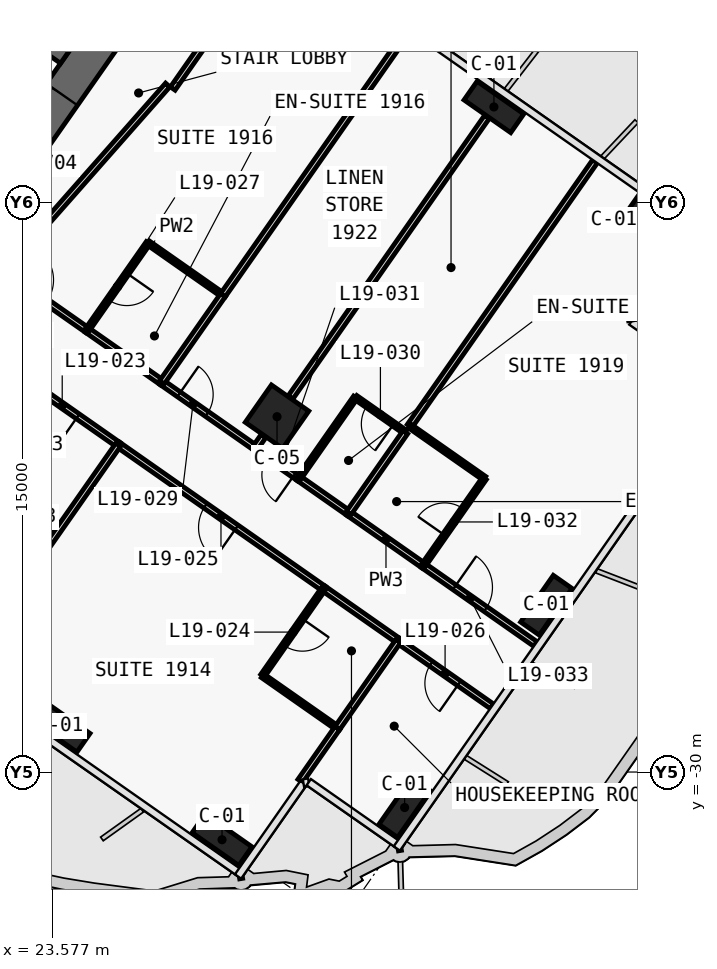
"""IFC4 building model, lengths in metres.
Left out: names, types, materials, properties, quantities, classifications, styles, units other than length and angle.
Written with IfcOpenShell. Run it as: python <this file> out.ifc"""

import sys

from ifc_helpers import new_model, si_unit, direction, frame, frame_2d, origin, origin_2d, place, context, subcontext, project, spatial, polyline, rectangle, outline, extrude, element, fill, save


model = new_model("IFC4")
c1 = context("Model", 3, precision=1e-05, world=origin(), true_north=direction((0.0, 1.0)))
c2 = subcontext(c1, "Body", "Model", "MODEL_VIEW")
j1 = project(units=[si_unit("LENGTHUNIT", "METRE"), si_unit("PLANEANGLEUNIT", "RADIAN")], contexts=[c1])
p1 = place(None, origin())
s1 = spatial("IfcSite", under=j1, at=p1, CompositionType="ELEMENT")
p2 = place(p1, origin())
s2 = spatial("IfcBuilding", under=s1, at=p2, CompositionType="ELEMENT")
p3 = place(p2, frame((0.0, 0.0, 94.1)))
s3 = spatial("IfcBuildingStorey", under=s2, at=p3, CompositionType="ELEMENT", Elevation=94.1)
p4 = place(p3, frame((21.708, -15.2, 0.0), z_axis=(0.0, 0.0, 1.0), x_axis=(0.573576324356, 0.819152122709, 0.0)))
e1 = element("IfcWall", 1, at=p4, inside=s3, PredefinedType="SHEAR", context=c2, shape_type="SweptSolid", body=[
    extrude(outline(polyline([(9.2, 0.5), (0.0, 0.5), (0.0, -0.5), (9.2, -0.5), (9.2, 0.5)])), origin(), (0.0, 0.0, 1.0), 3.6),
])
p5 = place(p4, frame((6.1, 0.0, 0.0)))
e2 = element("IfcOpeningElement", 2, at=p5, cuts=e1, PredefinedType="OPENING", context=c2, shape_type="SweptSolid", body=[
    extrude(rectangle(XDim=1.8, YDim=2.1, at=frame_2d((0.9, 1.05))), frame((0.0, 0.51, 0.0), z_axis=(0.0, -1.0, 0.0), x_axis=(1.0, 0.0, 0.0)), (0.0, 0.0, 1.0), 1.02),
])
p6 = place(p4, frame((1.9, 0.0, 0.0)))
e3 = element("IfcOpeningElement", 3, at=p6, cuts=e1, PredefinedType="OPENING", context=c2, shape_type="SweptSolid", body=[
    extrude(rectangle(XDim=1.8, YDim=2.1, at=frame_2d((0.9, 1.05))), frame((0.0, 0.51, 0.0), z_axis=(0.0, -1.0, 0.0), x_axis=(1.0, 0.0, 0.0)), (0.0, 0.0, 1.0), 1.02),
])
p7 = place(p3, frame((2.638, 3.768, 0.0), z_axis=(0.0, 0.0, 1.0), x_axis=(0.819148977158, -0.573580816643, 0.0)))
e4 = element("IfcWall", 4, at=p7, inside=s3, PredefinedType="SHEAR", context=c2, shape_type="SweptSolid", body=[
    extrude(outline(polyline([(0.0, 0.25), (0.0, -0.25), (26.0, -0.25), (26.0, 0.25), (0.0, 0.25)])), origin(), (0.0, 0.0, 1.0), 3.6),
])
p8 = place(p7, frame((9.637, 0.0, 0.0)))
e5 = element("IfcOpeningElement", 5, at=p8, cuts=e4, PredefinedType="OPENING", context=c2, shape_type="SweptSolid", body=[
    extrude(rectangle(XDim=1.2, YDim=2.1, at=frame_2d((0.6, 1.05))), frame((0.0, 0.26, 0.0), z_axis=(0.0, -1.0, 0.0), x_axis=(1.0, 0.0, 0.0)), (0.0, 0.0, 1.0), 0.52),
])
p9 = place(p7, frame((11.812, 0.0, 0.0)))
e6 = element("IfcOpeningElement", 6, at=p9, cuts=e4, PredefinedType="OPENING", context=c2, shape_type="SweptSolid", body=[
    extrude(rectangle(XDim=1.2, YDim=2.1, at=frame_2d((0.6, 1.05))), frame((0.0, 0.26, 0.0), z_axis=(0.0, -1.0, 0.0), x_axis=(1.0, 0.0, 0.0)), (0.0, 0.0, 1.0), 0.52),
])
p10 = place(p7, frame((13.988, 0.0, 0.0)))
e7 = element("IfcOpeningElement", 7, at=p10, cuts=e4, PredefinedType="OPENING", context=c2, shape_type="SweptSolid", body=[
    extrude(rectangle(XDim=1.2, YDim=2.1, at=frame_2d((0.6, 1.05))), frame((0.0, 0.26, 0.0), z_axis=(0.0, -1.0, 0.0), x_axis=(1.0, 0.0, 0.0)), (0.0, 0.0, 1.0), 0.52),
])
p11 = place(p7, frame((16.262, 0.0, 0.0)))
e8 = element("IfcOpeningElement", 8, at=p11, cuts=e4, PredefinedType="OPENING", context=c2, shape_type="SweptSolid", body=[
    extrude(rectangle(XDim=1.0, YDim=2.1, at=frame_2d((0.5, 1.05))), frame((0.0, 0.26, 0.0), z_axis=(0.0, -1.0, 0.0), x_axis=(1.0, 0.0, 0.0)), (0.0, 0.0, 1.0), 0.52),
])
for number, where, z_axis, x_axis in (
    (9, (23.782, -28.799, 0.0), (0.0, 0.0, 1.0), (0.819, -0.574, 0.0)),
    (10, (28.042, -31.782, 0.0), (0.0, 0.0, 1.0), (0.819, -0.574, 0.0)),
    (11, (35.197, -12.498, 0.0), (0.0, 0.0, 1.0), (0.819, -0.574, 0.0)),
    (12, (39.456, -15.481, 0.0), (0.0, 0.0, 1.0), (0.819, -0.574, 0.0)),
    (13, (32.847, -30.935, 0.0), (0.0, 0.0, 1.0), (0.574, 0.819, 0.0)),
    (14, (36.575, -25.61, 0.0), (0.0, 0.0, 1.0), (0.574, 0.819, 0.0)),
):
    element("IfcColumn", number, at=place(p3, frame(where, z_axis=z_axis, x_axis=x_axis)), inside=s3, PredefinedType="COLUMN", context=c2, shape_type="SweptSolid", body=[
        extrude(rectangle(XDim=1.5, YDim=0.6, at=origin_2d()), origin(), (0.0, 0.0, 1.0), 3.6),
    ])
p12 = place(p3, frame((29.49, -20.649, 0.0), z_axis=(0.0, 0.0, 1.0), x_axis=(0.819152044289, -0.573576436351, 0.0)))
e15 = element("IfcColumn", 15, at=p12, inside=s3, PredefinedType="COLUMN", context=c2, shape_type="SweptSolid", body=[
    extrude(rectangle(XDim=1.2, YDim=1.2, at=origin_2d()), origin(), (0.0, 0.0, 1.0), 3.6),
])
p13 = place(p3, frame((22.284, -16.824, 0.0), z_axis=(0.0, 0.0, 1.0), x_axis=(0.819176640776, -0.573541307325, 0.0)))
e16 = element("IfcWall", 16, at=p13, inside=s3, PredefinedType="PARTITIONING", context=c2, shape_type="SweptSolid", body=[
    extrude(rectangle(XDim=2.698, YDim=0.15, at=frame_2d((1.349, 0.0))), origin(), (0.0, 0.0, 1.0), 3.32),
])
p14 = place(p13, frame((0.396, 0.0, 0.0)))
e17 = element("IfcOpeningElement", 17, at=p14, cuts=e16, PredefinedType="OPENING", context=c2, shape_type="SweptSolid", body=[
    extrude(rectangle(XDim=1.0, YDim=2.1, at=frame_2d((0.5, 1.05))), frame((0.0, 0.085, 0.0), z_axis=(0.0, -1.0, 0.0), x_axis=(1.0, 0.0, 0.0)), (0.0, 0.0, 1.0), 0.17),
])
p15 = place(p3, frame((24.491, -18.369, 0.0), z_axis=(0.0, 0.0, 1.0), x_axis=(0.819179439794, -0.573537309527, 0.0)))
e18 = element("IfcWall", 18, at=p15, inside=s3, PredefinedType="PARTITIONING", context=c2, shape_type="SweptSolid", body=[
    extrude(rectangle(XDim=2.404, YDim=0.15, at=frame_2d((1.202, 0.0))), origin(), (0.0, 0.0, 1.0), 3.32),
])
p16 = place(p3, frame((26.457, -19.746, 0.0), z_axis=(0.0, 0.0, 1.0), x_axis=(0.81916700466, -0.573555070134, 0.0)))
e19 = element("IfcWall", 19, at=p16, inside=s3, PredefinedType="PARTITIONING", context=c2, shape_type="SweptSolid", body=[
    extrude(rectangle(XDim=3.004, YDim=0.15, at=frame_2d((1.502, 0.0))), origin(), (0.0, 0.0, 1.0), 2.6),
])
p17 = place(p16, frame((0.552, 0.0, 0.0)))
e20 = element("IfcOpeningElement", 20, at=p17, cuts=e19, PredefinedType="OPENING", context=c2, shape_type="SweptSolid", body=[
    extrude(rectangle(XDim=0.9, YDim=2.1, at=frame_2d((0.45, 1.05))), frame((0.0, 0.085, 0.0), z_axis=(0.0, -1.0, 0.0), x_axis=(1.0, 0.0, 0.0)), (0.0, 0.0, 1.0), 0.17),
])
p18 = place(p3, frame((30.063, -22.271, 0.0), z_axis=(0.0, 0.0, 1.0), x_axis=(-0.81914197737, 0.573590813132, 0.0)))
e21 = element("IfcWall", 21, at=p18, inside=s3, PredefinedType="PARTITIONING", context=c2, shape_type="SweptSolid", body=[
    extrude(rectangle(XDim=1.403, YDim=0.15, at=frame_2d((0.701, 0.0))), origin(), (0.0, 0.0, 1.0), 2.6),
])
p19 = place(p18, frame((0.15, 0.0, 0.0)))
e22 = element("IfcOpeningElement", 22, at=p19, cuts=e21, PredefinedType="OPENING", context=c2, shape_type="SweptSolid", body=[
    extrude(rectangle(XDim=0.85, YDim=2.1, at=frame_2d((0.425, 1.05))), frame((0.0, 0.085, 0.0), z_axis=(0.0, -1.0, 0.0), x_axis=(1.0, 0.0, 0.0)), (0.0, 0.0, 1.0), 0.17),
])
p20 = place(p3, frame((30.061, -22.27, 0.0), z_axis=(0.0, 0.0, 1.0), x_axis=(0.819189013667, -0.573523634986, 0.0)))
e23 = element("IfcWall", 23, at=p20, inside=s3, PredefinedType="PARTITIONING", context=c2, shape_type="SweptSolid", body=[
    extrude(rectangle(XDim=1.604, YDim=0.15, at=frame_2d((0.802, 0.0))), origin(), (0.0, 0.0, 1.0), 3.32),
])
p21 = place(p3, frame((33.338, -24.565, 0.0), z_axis=(0.0, 0.0, 1.0), x_axis=(0.819171400631, -0.573548791636, 0.0)))
e24 = element("IfcWall", 24, at=p21, inside=s3, PredefinedType="PARTITIONING", context=c2, shape_type="SweptSolid", body=[
    extrude(rectangle(XDim=3.601, YDim=0.15, at=frame_2d((1.801, 0.0))), origin(), (0.0, 0.0, 1.0), 2.5),
])
p22 = place(p21, frame((1.001, 0.0, 0.0)))
e25 = element("IfcOpeningElement", 25, at=p22, cuts=e24, PredefinedType="OPENING", context=c2, shape_type="SweptSolid", body=[
    extrude(rectangle(XDim=1.0, YDim=2.1, at=frame_2d((0.5, 1.05))), frame((0.0, 0.085, 0.0), z_axis=(0.0, -1.0, 0.0), x_axis=(1.0, 0.0, 0.0)), (0.0, 0.0, 1.0), 0.17),
])
p23 = place(p3, frame((31.372, -23.188, 0.0), z_axis=(0.0, 0.0, 1.0), x_axis=(0.819179439794, -0.573537309527, 0.0)))
e26 = element("IfcWall", 26, at=p23, inside=s3, PredefinedType="PARTITIONING", context=c2, shape_type="SweptSolid", body=[
    extrude(rectangle(XDim=2.404, YDim=0.15, at=frame_2d((1.202, 0.0))), origin(), (0.0, 0.0, 1.0), 3.32),
])
p24 = place(p3, frame((25.313, -21.387, 0.0), z_axis=(0.0, 0.0, 1.0), x_axis=(-0.819145961204, 0.573585123798, 0.0)))
e27 = element("IfcWall", 27, at=p24, inside=s3, PredefinedType="PARTITIONING", context=c2, shape_type="SweptSolid", body=[
    extrude(rectangle(XDim=3.603, YDim=0.15, at=frame_2d((1.802, 0.0))), origin(), (0.0, 0.0, 1.0), 3.32),
])
p25 = place(p24, frame((1.302, 0.0, 0.0)))
e28 = element("IfcOpeningElement", 28, at=p25, cuts=e27, PredefinedType="OPENING", context=c2, shape_type="SweptSolid", body=[
    extrude(rectangle(XDim=1.0, YDim=2.1, at=frame_2d((0.5, 1.05))), frame((0.0, 0.085, 0.0), z_axis=(0.0, -1.0, 0.0), x_axis=(1.0, 0.0, 0.0)), (0.0, 0.0, 1.0), 0.17),
])
p26 = place(p3, frame((30.719, -25.172, 0.0), z_axis=(0.0, 0.0, 1.0), x_axis=(-0.819153746897, 0.573574004767, 0.0)))
e29 = element("IfcWall", 29, at=p26, inside=s3, PredefinedType="PARTITIONING", context=c2, shape_type="SweptSolid", body=[
    extrude(rectangle(XDim=6.603, YDim=0.15, at=frame_2d((3.302, 0.0))), origin(), (0.0, 0.0, 1.0), 2.6),
])
p27 = place(p26, frame((2.801, 0.0, 0.0)))
e30 = element("IfcOpeningElement", 30, at=p27, cuts=e29, PredefinedType="OPENING", context=c2, shape_type="SweptSolid", body=[
    extrude(rectangle(XDim=1.0, YDim=2.1, at=frame_2d((0.5, 1.05))), frame((0.0, 0.085, 0.0), z_axis=(0.0, -1.0, 0.0), x_axis=(1.0, 0.0, 0.0)), (0.0, 0.0, 1.0), 0.17),
])
p28 = place(p3, frame((32.685, -26.549, 0.0), z_axis=(0.0, 0.0, 1.0), x_axis=(-0.819146032251, 0.573585022335, 0.0)))
e31 = element("IfcWall", 31, at=p28, inside=s3, PredefinedType="PARTITIONING", context=c2, shape_type="SweptSolid", body=[
    extrude(rectangle(XDim=2.404, YDim=0.15, at=frame_2d((1.202, 0.0))), origin(), (0.0, 0.0, 1.0), 3.32),
])
p29 = place(p3, frame((35.141, -28.268, 0.0), z_axis=(0.0, 0.0, 1.0), x_axis=(-0.81915932427, 0.57356603932, 0.0)))
e32 = element("IfcWall", 32, at=p29, inside=s3, PredefinedType="PARTITIONING", context=c2, shape_type="SweptSolid", body=[
    extrude(rectangle(XDim=3.002, YDim=0.15, at=frame_2d((1.501, 0.0))), origin(), (0.0, 0.0, 1.0), 2.5),
])
p30 = place(p29, frame((1.051, 0.0, 0.0)))
e33 = element("IfcOpeningElement", 33, at=p30, cuts=e32, PredefinedType="OPENING", context=c2, shape_type="SweptSolid", body=[
    extrude(rectangle(XDim=0.9, YDim=2.1, at=frame_2d((0.45, 1.05))), frame((0.0, 0.085, 0.0), z_axis=(0.0, -1.0, 0.0), x_axis=(1.0, 0.0, 0.0)), (0.0, 0.0, 1.0), 0.17),
])
p31 = place(p3, frame((26.098, -16.076, 0.0), z_axis=(0.0, 0.0, 1.0), x_axis=(-0.573550118428, -0.819170471667, 0.0)))
e34 = element("IfcWall", 34, at=p31, inside=s3, PredefinedType="PARTITIONING", context=c2, shape_type="SweptSolid", body=[
    extrude(rectangle(XDim=2.8, YDim=0.12, at=frame_2d((1.4, 0.0))), origin(), (0.0, 0.0, 1.0), 2.6),
])
p32 = place(p31, frame((0.975, 0.0, 0.0)))
e35 = element("IfcOpeningElement", 35, at=p32, cuts=e34, PredefinedType="OPENING", context=c2, shape_type="SweptSolid", body=[
    extrude(rectangle(XDim=0.85, YDim=2.05, at=frame_2d((0.425, 1.025))), frame((0.0, 0.07, 0.0), z_axis=(0.0, -1.0, 0.0), x_axis=(1.0, 0.0, 0.0)), (0.0, 0.0, 1.0), 0.14),
])
p33 = place(p3, frame((28.065, -17.453, 0.0), z_axis=(0.0, 0.0, 1.0), x_axis=(-0.819155442668, 0.573571582932, 0.0)))
e36 = element("IfcWall", 36, at=p33, inside=s3, PredefinedType="PARTITIONING", context=c2, shape_type="SweptSolid", body=[
    extrude(rectangle(XDim=2.4, YDim=0.12, at=frame_2d((1.2, 0.0))), origin(), (0.0, 0.0, 1.0), 3.32),
])
p34 = place(p3, frame((32.94, -10.491, 0.0), z_axis=(0.0, 0.0, 1.0), x_axis=(-0.573593433868, -0.819140142237, 0.0)))
e37 = element("IfcWall", 37, at=p34, inside=s3, PredefinedType="PARTITIONING", context=c2, shape_type="SweptSolid", body=[
    extrude(rectangle(XDim=8.499, YDim=0.15, at=frame_2d((4.25, 0.0))), origin(), (0.0, 0.0, 1.0), 2.6),
])
p35 = place(p3, frame((22.285, -16.825, 0.0), z_axis=(0.0, 0.0, 1.0), x_axis=(0.661551268245, 0.749899939647, 0.0)))
e38 = element("IfcWall", 38, at=p35, inside=s3, PredefinedType="PARTITIONING", context=c2, shape_type="SweptSolid", body=[
    extrude(rectangle(XDim=6.541, YDim=0.15, at=frame_2d((3.271, 0.0))), origin(), (0.0, 0.0, 1.0), 2.6),
])
p36 = place(p3, frame((26.746, -12.014, 0.0), z_axis=(0.0, 0.0, 1.0), x_axis=(0.573560650686, 0.819163097304, 0.0)))
e39 = element("IfcWall", 39, at=p36, inside=s3, PredefinedType="PARTITIONING", context=c2, shape_type="SweptSolid", body=[
    extrude(rectangle(XDim=3.0, YDim=0.15, at=frame_2d((1.5, 0.0))), origin(), (0.0, 0.0, 1.0), 3.32),
])
p37 = place(p3, frame((28.064, -17.454, 0.0), z_axis=(0.0, 0.0, 1.0), x_axis=(-0.573550118428, -0.819170471667, 0.0)))
e40 = element("IfcWall", 40, at=p37, inside=s3, PredefinedType="PARTITIONING", context=c2, shape_type="SweptSolid", body=[
    extrude(rectangle(XDim=2.8, YDim=0.15, at=frame_2d((1.4, 0.0))), origin(), (0.0, 0.0, 1.0), 2.6),
])
p38 = place(p3, frame((35.013, -12.76, 0.0), z_axis=(0.0, 0.0, 1.0), x_axis=(-0.573558725113, -0.819164445546, 0.0)))
e41 = element("IfcWall", 41, at=p38, inside=s3, PredefinedType="PARTITIONING", context=c2, shape_type="SweptSolid", body=[
    extrude(rectangle(XDim=9.01, YDim=0.15, at=frame_2d((4.505, 0.0))), origin(), (0.0, 0.0, 1.0), 2.6),
])
p39 = place(p3, frame((29.134, -21.156, 0.0), z_axis=(0.0, 0.0, 1.0), x_axis=(-0.572944929411, -0.819593867633, 0.0)))
e42 = element("IfcWall", 42, at=p39, inside=s3, PredefinedType="PARTITIONING", context=c2, shape_type="SweptSolid", body=[
    extrude(rectangle(XDim=0.38, YDim=0.15, at=frame_2d((0.19, 0.0))), origin(), (0.0, 0.0, 1.0), 2.6),
])
p40 = place(p3, frame((32.865, -21.058, 0.0), z_axis=(0.0, 0.0, 1.0), x_axis=(-0.819131543282, 0.57360571371, 0.0)))
e43 = element("IfcWall", 43, at=p40, inside=s3, PredefinedType="PARTITIONING", context=c2, shape_type="SweptSolid", body=[
    extrude(rectangle(XDim=1.6, YDim=0.12, at=frame_2d((0.8, 0.0))), origin(), (0.0, 0.0, 1.0), 3.32),
])
p41 = place(p40, frame((0.375, 0.0, 0.0)))
e44 = element("IfcOpeningElement", 44, at=p41, cuts=e43, PredefinedType="OPENING", context=c2, shape_type="SweptSolid", body=[
    extrude(rectangle(XDim=0.85, YDim=2.05, at=frame_2d((0.425, 1.025))), frame((0.0, 0.07, 0.0), z_axis=(0.0, -1.0, 0.0), x_axis=(1.0, 0.0, 0.0)), (0.0, 0.0, 1.0), 0.14),
])
p42 = place(p3, frame((31.553, -20.14, 0.0), z_axis=(0.0, 0.0, 1.0), x_axis=(-0.573537965655, -0.819178980414, 0.0)))
e45 = element("IfcWall", 45, at=p42, inside=s3, PredefinedType="PARTITIONING", context=c2, shape_type="SweptSolid", body=[
    extrude(rectangle(XDim=2.6, YDim=0.12, at=frame_2d((1.3, 0.0))), origin(), (0.0, 0.0, 1.0), 2.6),
])
p43 = place(p3, frame((37.855, -13.932, 0.0), z_axis=(0.0, 0.0, 1.0), x_axis=(-0.573576058406, -0.819152308929, 0.0)))
e46 = element("IfcWall", 46, at=p43, inside=s3, PredefinedType="PARTITIONING", context=c2, shape_type="SweptSolid", body=[
    extrude(rectangle(XDim=8.501, YDim=0.15, at=frame_2d((4.25, 0.0))), origin(), (0.0, 0.0, 1.0), 2.5),
])
p44 = place(p3, frame((32.865, -21.059, 0.0), z_axis=(0.0, 0.0, 1.0), x_axis=(-0.573600972199, -0.819134863556, 0.0)))
e47 = element("IfcWall", 47, at=p44, inside=s3, PredefinedType="PARTITIONING", context=c2, shape_type="SweptSolid", body=[
    extrude(rectangle(XDim=2.6, YDim=0.15, at=frame_2d((1.3, 0.0))), origin(), (0.0, 0.0, 1.0), 2.6),
])
p45 = place(p3, frame((33.34, -24.566, 0.0), z_axis=(0.0, 0.0, 1.0), x_axis=(0.573608623498, 0.819129505664, 0.0)))
e48 = element("IfcWall", 48, at=p45, inside=s3, PredefinedType="PARTITIONING", context=c2, shape_type="SweptSolid", body=[
    extrude(rectangle(XDim=2.8, YDim=0.12, at=frame_2d((1.4, 0.0))), origin(), (0.0, 0.0, 1.0), 2.6),
])
p46 = place(p45, frame((0.975, 0.0, 0.0)))
e49 = element("IfcOpeningElement", 49, at=p46, cuts=e48, PredefinedType="OPENING", context=c2, shape_type="SweptSolid", body=[
    extrude(rectangle(XDim=0.85, YDim=2.05, at=frame_2d((0.425, 1.025))), frame((0.0, 0.07, 0.0), z_axis=(0.0, -1.0, 0.0), x_axis=(1.0, 0.0, 0.0)), (0.0, 0.0, 1.0), 0.14),
])
p47 = place(p3, frame((34.946, -22.271, 0.0), z_axis=(0.0, 0.0, 1.0), x_axis=(-0.819155442668, 0.573571582932, 0.0)))
e50 = element("IfcWall", 50, at=p47, inside=s3, PredefinedType="PARTITIONING", context=c2, shape_type="SweptSolid", body=[
    extrude(rectangle(XDim=2.4, YDim=0.12, at=frame_2d((1.2, 0.0))), origin(), (0.0, 0.0, 1.0), 3.32),
])
p48 = place(p3, frame((25.311, -21.385, 0.0), z_axis=(0.0, 0.0, 1.0), x_axis=(-0.573572324301, -0.819154923562, 0.0)))
e51 = element("IfcWall", 51, at=p48, inside=s3, PredefinedType="PARTITIONING", context=c2, shape_type="SweptSolid", body=[
    extrude(rectangle(XDim=7.3, YDim=0.15, at=frame_2d((3.65, 0.0))), origin(), (0.0, 0.0, 1.0), 2.5),
])
p49 = place(p3, frame((30.717, -25.17, 0.0), z_axis=(0.0, 0.0, 1.0), x_axis=(-0.573550118428, -0.819170471667, 0.0)))
e52 = element("IfcWall", 52, at=p49, inside=s3, PredefinedType="PARTITIONING", context=c2, shape_type="SweptSolid", body=[
    extrude(rectangle(XDim=2.8, YDim=0.12, at=frame_2d((1.4, 0.0))), origin(), (0.0, 0.0, 1.0), 3.32),
])
p50 = place(p49, frame((0.975, 0.0, 0.0)))
e53 = element("IfcOpeningElement", 53, at=p50, cuts=e52, PredefinedType="OPENING", context=c2, shape_type="SweptSolid", body=[
    extrude(rectangle(XDim=0.85, YDim=2.05, at=frame_2d((0.425, 1.025))), frame((0.0, 0.07, 0.0), z_axis=(0.0, -1.0, 0.0), x_axis=(1.0, 0.0, 0.0)), (0.0, 0.0, 1.0), 0.14),
])
p51 = place(p3, frame((29.111, -27.466, 0.0), z_axis=(0.0, 0.0, 1.0), x_axis=(0.819188907105, -0.573523787192, 0.0)))
e54 = element("IfcWall", 54, at=p51, inside=s3, PredefinedType="PARTITIONING", context=c2, shape_type="SweptSolid", body=[
    extrude(rectangle(XDim=2.4, YDim=0.12, at=frame_2d((1.2, 0.0))), origin(), (0.0, 0.0, 1.0), 3.32),
])
p52 = place(p3, frame((31.077, -28.842, 0.0), z_axis=(0.0, 0.0, 1.0), x_axis=(-0.573597175316, -0.819137522318, 0.0)))
e55 = element("IfcWall", 55, at=p52, inside=s3, PredefinedType="PARTITIONING", context=c2, shape_type="SweptSolid", body=[
    extrude(rectangle(XDim=1.701, YDim=0.15, at=frame_2d((0.851, 0.0))), origin(), (0.0, 0.0, 1.0), 3.32),
])
p53 = place(p3, frame((32.684, -26.548, 0.0), z_axis=(0.0, 0.0, 1.0), x_axis=(-0.573550118428, -0.819170471667, 0.0)))
e56 = element("IfcWall", 56, at=p53, inside=s3, PredefinedType="PARTITIONING", context=c2, shape_type="SweptSolid", body=[
    extrude(rectangle(XDim=2.8, YDim=0.15, at=frame_2d((1.4, 0.0))), origin(), (0.0, 0.0, 1.0), 3.32),
])
p54 = place(p6, origin())
e57 = element("IfcDoor", 57, at=p54, inside=s3, OperationType="DOUBLE_DOOR_SINGLE_SWING", PredefinedType="DOOR", context=c2, shape_type="SweptSolid", body=[
    extrude(rectangle(XDim=1.8, YDim=2.1, at=frame_2d((0.9, 1.05))), frame((0.0, 0.025, 0.0), z_axis=(0.0, -1.0, 0.0), x_axis=(1.0, 0.0, 0.0)), (0.0, 0.0, 1.0), 0.05),
])
fill(e3, e57)
p55 = place(p25, origin())
e58 = element("IfcDoor", 58, at=p55, inside=s3, OperationType="SINGLE_SWING_LEFT", PredefinedType="DOOR", context=c2, shape_type="SweptSolid", body=[
    extrude(rectangle(XDim=1.0, YDim=2.1, at=frame_2d((0.5, 1.05))), frame((0.0, 0.025, 0.0), z_axis=(0.0, -1.0, 0.0), x_axis=(1.0, 0.0, 0.0)), (0.0, 0.0, 1.0), 0.05),
])
fill(e28, e58)
p56 = place(p50, origin())
e59 = element("IfcDoor", 59, at=p56, inside=s3, OperationType="SINGLE_SWING_RIGHT", PredefinedType="DOOR", context=c2, shape_type="SweptSolid", body=[
    extrude(rectangle(XDim=0.85, YDim=2.05, at=frame_2d((0.425, 1.025))), frame((0.0, 0.025, 0.0), z_axis=(0.0, -1.0, 0.0), x_axis=(1.0, 0.0, 0.0)), (0.0, 0.0, 1.0), 0.05),
])
fill(e53, e59)
p57 = place(p27, origin())
e60 = element("IfcDoor", 60, at=p57, inside=s3, OperationType="SINGLE_SWING_RIGHT", PredefinedType="DOOR", context=c2, shape_type="SweptSolid", body=[
    extrude(rectangle(XDim=1.0, YDim=2.1, at=frame_2d((0.5, 1.05))), frame((0.0, 0.025, 0.0), z_axis=(0.0, -1.0, 0.0), x_axis=(1.0, 0.0, 0.0)), (0.0, 0.0, 1.0), 0.05),
])
fill(e30, e60)
p58 = place(p30, origin())
e61 = element("IfcDoor", 61, at=p58, inside=s3, OperationType="SINGLE_SWING_LEFT", PredefinedType="DOOR", context=c2, shape_type="SweptSolid", body=[
    extrude(rectangle(XDim=0.9, YDim=2.1, at=frame_2d((0.45, 1.05))), frame((0.0, 0.025, 0.0), z_axis=(0.0, -1.0, 0.0), x_axis=(1.0, 0.0, 0.0)), (0.0, 0.0, 1.0), 0.05),
])
fill(e33, e61)
p59 = place(p32, origin())
e62 = element("IfcDoor", 62, at=p59, inside=s3, OperationType="SINGLE_SWING_LEFT", PredefinedType="DOOR", context=c2, shape_type="SweptSolid", body=[
    extrude(rectangle(XDim=0.85, YDim=2.05, at=frame_2d((0.425, 1.025))), frame((0.0, 0.025, 0.0), z_axis=(0.0, -1.0, 0.0), x_axis=(1.0, 0.0, 0.0)), (0.0, 0.0, 1.0), 0.05),
])
fill(e35, e62)
p60 = place(p17, origin())
e63 = element("IfcDoor", 63, at=p60, inside=s3, OperationType="SINGLE_SWING_LEFT", PredefinedType="DOOR", context=c2, shape_type="SweptSolid", body=[
    extrude(rectangle(XDim=0.9, YDim=2.1, at=frame_2d((0.45, 1.05))), frame((0.0, 0.025, 0.0), z_axis=(0.0, -1.0, 0.0), x_axis=(1.0, 0.0, 0.0)), (0.0, 0.0, 1.0), 0.05),
])
fill(e20, e63)
p61 = place(p41, origin())
e64 = element("IfcDoor", 64, at=p61, inside=s3, OperationType="SINGLE_SWING_RIGHT", PredefinedType="DOOR", context=c2, shape_type="SweptSolid", body=[
    extrude(rectangle(XDim=0.85, YDim=2.05, at=frame_2d((0.425, 1.025))), frame((0.0, 0.025, 0.0), z_axis=(0.0, -1.0, 0.0), x_axis=(1.0, 0.0, 0.0)), (0.0, 0.0, 1.0), 0.05),
])
fill(e44, e64)
p62 = place(p19, origin())
e65 = element("IfcDoor", 65, at=p62, inside=s3, OperationType="SINGLE_SWING_RIGHT", PredefinedType="DOOR", context=c2, shape_type="SweptSolid", body=[
    extrude(rectangle(XDim=0.85, YDim=2.1, at=frame_2d((0.425, 1.05))), frame((0.0, 0.025, 0.0), z_axis=(0.0, -1.0, 0.0), x_axis=(1.0, 0.0, 0.0)), (0.0, 0.0, 1.0), 0.05),
])
fill(e22, e65)
p63 = place(p46, origin())
e66 = element("IfcDoor", 66, at=p63, inside=s3, OperationType="SINGLE_SWING_RIGHT", PredefinedType="DOOR", context=c2, shape_type="SweptSolid", body=[
    extrude(rectangle(XDim=0.85, YDim=2.05, at=frame_2d((0.425, 1.025))), frame((0.0, 0.025, 0.0), z_axis=(0.0, -1.0, 0.0), x_axis=(1.0, 0.0, 0.0)), (0.0, 0.0, 1.0), 0.05),
])
fill(e49, e66)
p64 = place(p22, origin())
e67 = element("IfcDoor", 67, at=p64, inside=s3, OperationType="SINGLE_SWING_RIGHT", PredefinedType="DOOR", context=c2, shape_type="SweptSolid", body=[
    extrude(rectangle(XDim=1.0, YDim=2.1, at=frame_2d((0.5, 1.05))), frame((0.0, 0.025, 0.0), z_axis=(0.0, -1.0, 0.0), x_axis=(1.0, 0.0, 0.0)), (0.0, 0.0, 1.0), 0.05),
])
fill(e25, e67)
save(model, sys.argv[1])
